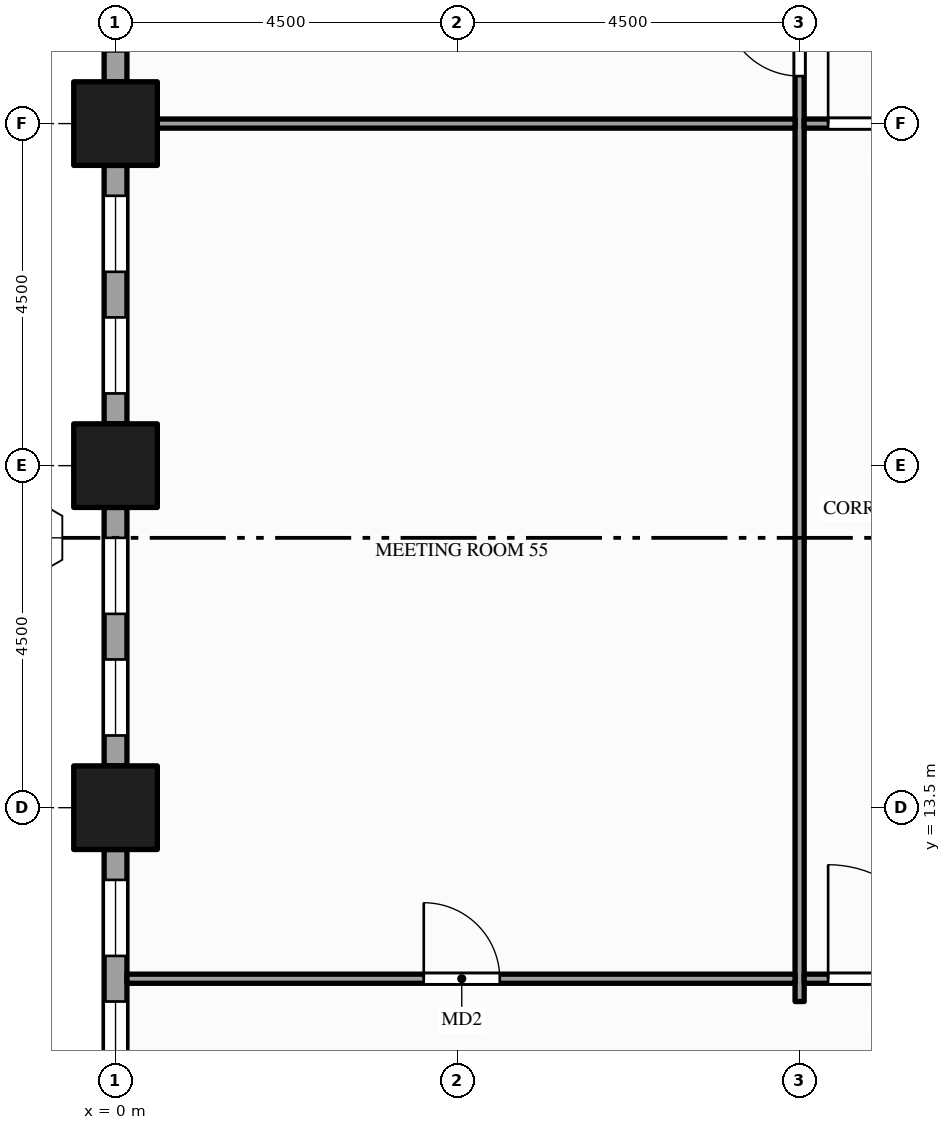
"""IFC4 building model, lengths in metres.
Left out: names, types, materials, properties, quantities, classifications, styles, units other than length and angle.
Written with IfcOpenShell. Run it as: python <this file> out.ifc"""

import sys

from ifc_helpers import new_model, si_unit, direction, frame, frame_2d, origin, origin_2d, place, context, subcontext, project, spatial, rectangle, hollow_rectangle, extrude, element, fill, save


model = new_model("IFC4")
c1 = context("Model", 3, precision=1e-05, world=origin(), true_north=direction((0.0, 1.0)))
c2 = subcontext(c1, "Body", "Model", "MODEL_VIEW")
j1 = project(units=[si_unit("LENGTHUNIT", "METRE"), si_unit("PLANEANGLEUNIT", "RADIAN")], contexts=[c1])
p1 = place(None, origin())
s1 = spatial("IfcSite", under=j1, at=p1, CompositionType="ELEMENT")
p2 = place(p1, origin())
s2 = spatial("IfcBuilding", under=s1, at=p2, CompositionType="ELEMENT")
p3 = place(p2, frame((0.0, 0.0, 8.0)))
s3 = spatial("IfcBuildingStorey", under=s2, at=p3, CompositionType="ELEMENT", Elevation=8.0)
for number, where, z_axis, x_axis in (
    (1, (0.0, 13.5, -0.25), (0.0, 0.0, 1.0), (1.0, 0.0, 0.0)),
    (2, (0.0, 18.0, -0.25), (0.0, 0.0, 1.0), (1.0, 0.0, 0.0)),
    (3, (0.0, 22.5, -0.25), (0.0, 0.0, 1.0), (1.0, 0.0, 0.0)),
):
    element("IfcColumn", number, at=place(p3, frame(where, z_axis=z_axis, x_axis=x_axis)), inside=s3, PredefinedType="COLUMN", context=c2, shape_type="SweptSolid", body=[
        extrude(hollow_rectangle(XDim=1.1, YDim=1.1, WallThickness=0.06, at=origin_2d()), origin(), (0.0, 0.0, 1.0), 6.0),
    ])
p4 = place(p3, frame((0.0, 26.45, 0.0), z_axis=(0.0, 0.0, 1.0), x_axis=(0.0, -1.0, 0.0)))
e4 = element("IfcWall", 4, at=p4, inside=s3, PredefinedType="STANDARD", context=c2, shape_type="SweptSolid", body=[
    extrude(rectangle(XDim=3.4, YDim=0.3, at=frame_2d((1.7, 0.0))), origin(), (0.0, 0.0, 1.0), 5.036),
])
p5 = place(p4, frame((0.4, 0.0, 0.9)))
e5 = element("IfcOpeningElement", 5, at=p5, cuts=e4, PredefinedType="OPENING", context=c2, shape_type="SweptSolid", body=[
    extrude(rectangle(XDim=1.0, YDim=3.5, at=frame_2d((0.5, 1.75))), frame((0.0, 0.16, 0.0), z_axis=(0.0, -1.0, 0.0), x_axis=(1.0, 0.0, 0.0)), (0.0, 0.0, 1.0), 0.32),
])
p6 = place(p4, frame((2.0, 0.0, 0.9)))
e6 = element("IfcOpeningElement", 6, at=p6, cuts=e4, PredefinedType="OPENING", context=c2, shape_type="SweptSolid", body=[
    extrude(rectangle(XDim=1.0, YDim=3.5, at=frame_2d((0.5, 1.75))), frame((0.0, 0.16, 0.0), z_axis=(0.0, -1.0, 0.0), x_axis=(1.0, 0.0, 0.0)), (0.0, 0.0, 1.0), 0.32),
])
p7 = place(p3, frame((0.0, 21.95, 0.0), z_axis=(0.0, 0.0, 1.0), x_axis=(0.0, -1.0, 0.0)))
e7 = element("IfcWall", 7, at=p7, inside=s3, PredefinedType="STANDARD", context=c2, shape_type="SweptSolid", body=[
    extrude(rectangle(XDim=3.4, YDim=0.3, at=frame_2d((1.7, 0.0))), origin(), (0.0, 0.0, 1.0), 5.036),
])
p8 = place(p7, frame((0.4, 0.0, 0.9)))
e8 = element("IfcOpeningElement", 8, at=p8, cuts=e7, PredefinedType="OPENING", context=c2, shape_type="SweptSolid", body=[
    extrude(rectangle(XDim=1.0, YDim=3.5, at=frame_2d((0.5, 1.75))), frame((0.0, 0.16, 0.0), z_axis=(0.0, -1.0, 0.0), x_axis=(1.0, 0.0, 0.0)), (0.0, 0.0, 1.0), 0.32),
])
p9 = place(p7, frame((2.0, 0.0, 0.9)))
e9 = element("IfcOpeningElement", 9, at=p9, cuts=e7, PredefinedType="OPENING", context=c2, shape_type="SweptSolid", body=[
    extrude(rectangle(XDim=1.0, YDim=3.5, at=frame_2d((0.5, 1.75))), frame((0.0, 0.16, 0.0), z_axis=(0.0, -1.0, 0.0), x_axis=(1.0, 0.0, 0.0)), (0.0, 0.0, 1.0), 0.32),
])
p10 = place(p3, frame((0.0, 17.45, 0.0), z_axis=(0.0, 0.0, 1.0), x_axis=(0.0, -1.0, 0.0)))
e10 = element("IfcWall", 10, at=p10, inside=s3, PredefinedType="STANDARD", context=c2, shape_type="SweptSolid", body=[
    extrude(rectangle(XDim=3.4, YDim=0.3, at=frame_2d((1.7, 0.0))), origin(), (0.0, 0.0, 1.0), 5.036),
])
p11 = place(p10, frame((0.4, 0.0, 0.9)))
e11 = element("IfcOpeningElement", 11, at=p11, cuts=e10, PredefinedType="OPENING", context=c2, shape_type="SweptSolid", body=[
    extrude(rectangle(XDim=1.0, YDim=3.5, at=frame_2d((0.5, 1.75))), frame((0.0, 0.16, 0.0), z_axis=(0.0, -1.0, 0.0), x_axis=(1.0, 0.0, 0.0)), (0.0, 0.0, 1.0), 0.32),
])
p12 = place(p10, frame((2.0, 0.0, 0.9)))
e12 = element("IfcOpeningElement", 12, at=p12, cuts=e10, PredefinedType="OPENING", context=c2, shape_type="SweptSolid", body=[
    extrude(rectangle(XDim=1.0, YDim=3.5, at=frame_2d((0.5, 1.75))), frame((0.0, 0.16, 0.0), z_axis=(0.0, -1.0, 0.0), x_axis=(1.0, 0.0, 0.0)), (0.0, 0.0, 1.0), 0.32),
])
p13 = place(p3, frame((0.0, 12.95, 0.0), z_axis=(0.0, 0.0, 1.0), x_axis=(0.0, -1.0, 0.0)))
e13 = element("IfcWall", 13, at=p13, inside=s3, PredefinedType="STANDARD", context=c2, shape_type="SweptSolid", body=[
    extrude(rectangle(XDim=3.4, YDim=0.3, at=frame_2d((1.7, 0.0))), origin(), (0.0, 0.0, 1.0), 5.036),
])
p14 = place(p13, frame((0.4, 0.0, 0.9)))
e14 = element("IfcOpeningElement", 14, at=p14, cuts=e13, PredefinedType="OPENING", context=c2, shape_type="SweptSolid", body=[
    extrude(rectangle(XDim=1.0, YDim=3.5, at=frame_2d((0.5, 1.75))), frame((0.0, 0.16, 0.0), z_axis=(0.0, -1.0, 0.0), x_axis=(1.0, 0.0, 0.0)), (0.0, 0.0, 1.0), 0.32),
])
p15 = place(p13, frame((2.0, 0.0, 0.9)))
e15 = element("IfcOpeningElement", 15, at=p15, cuts=e13, PredefinedType="OPENING", context=c2, shape_type="SweptSolid", body=[
    extrude(rectangle(XDim=1.0, YDim=3.5, at=frame_2d((0.5, 1.75))), frame((0.0, 0.16, 0.0), z_axis=(0.0, -1.0, 0.0), x_axis=(1.0, 0.0, 0.0)), (0.0, 0.0, 1.0), 0.32),
])
p16 = place(p3, frame((9.0, 10.95, 0.0), z_axis=(0.0, 0.0, 1.0), x_axis=(0.0, 1.0, 0.0)))
e16 = element("IfcWall", 16, at=p16, inside=s3, PredefinedType="PARTITIONING", context=c2, shape_type="SweptSolid", body=[
    extrude(rectangle(XDim=20.85, YDim=0.12, at=frame_2d((10.425, 0.0))), origin(), (0.0, 0.0, 1.0), 4.5),
])
p17 = place(p16, frame((12.175, 0.0, 0.0)))
e17 = element("IfcOpeningElement", 17, at=p17, cuts=e16, PredefinedType="OPENING", context=c2, shape_type="SweptSolid", body=[
    extrude(rectangle(XDim=1.0, YDim=2.1, at=frame_2d((0.5, 1.05))), frame((0.0, 0.07, 0.0), z_axis=(0.0, -1.0, 0.0), x_axis=(1.0, 0.0, 0.0)), (0.0, 0.0, 1.0), 0.14),
])
p18 = place(p16, frame((15.55, 0.0, 0.0)))
e18 = element("IfcOpeningElement", 18, at=p18, cuts=e16, PredefinedType="OPENING", context=c2, shape_type="SweptSolid", body=[
    extrude(rectangle(XDim=1.0, YDim=2.1, at=frame_2d((0.5, 1.05))), frame((0.0, 0.07, 0.0), z_axis=(0.0, -1.0, 0.0), x_axis=(1.0, 0.0, 0.0)), (0.0, 0.0, 1.0), 0.14),
])
p19 = place(p16, frame((18.925, 0.0, 0.0)))
e19 = element("IfcOpeningElement", 19, at=p19, cuts=e16, PredefinedType="OPENING", context=c2, shape_type="SweptSolid", body=[
    extrude(rectangle(XDim=1.0, YDim=2.1, at=frame_2d((0.5, 1.05))), frame((0.0, 0.07, 0.0), z_axis=(0.0, -1.0, 0.0), x_axis=(1.0, 0.0, 0.0)), (0.0, 0.0, 1.0), 0.14),
])
p20 = place(p3, frame((0.15, 11.25, 0.0), z_axis=(0.0, 0.0, 1.0), x_axis=(1.0, 0.0, 0.0)))
e20 = element("IfcWall", 20, at=p20, inside=s3, PredefinedType="PARTITIONING", context=c2, shape_type="SweptSolid", body=[
    extrude(rectangle(XDim=8.79, YDim=0.12, at=frame_2d((4.395, 0.0))), origin(), (0.0, 0.0, 1.0), 4.759),
])
p21 = place(p20, frame((3.905, 0.0, 0.0)))
e21 = element("IfcOpeningElement", 21, at=p21, cuts=e20, PredefinedType="OPENING", context=c2, shape_type="SweptSolid", body=[
    extrude(rectangle(XDim=1.0, YDim=2.1, at=frame_2d((0.5, 1.05))), frame((0.0, 0.07, 0.0), z_axis=(0.0, -1.0, 0.0), x_axis=(1.0, 0.0, 0.0)), (0.0, 0.0, 1.0), 0.14),
])
p22 = place(p3, frame((9.06, 11.25, 0.0), z_axis=(0.0, 0.0, 1.0), x_axis=(1.0, 0.0, 0.0)))
e22 = element("IfcWall", 22, at=p22, inside=s3, PredefinedType="PARTITIONING", context=c2, shape_type="SweptSolid", body=[
    extrude(rectangle(XDim=2.13, YDim=0.12, at=frame_2d((1.065, 0.0))), origin(), (0.0, 0.0, 1.0), 4.759),
])
p23 = place(p22, frame((0.315, 0.0, 0.0)))
e23 = element("IfcOpeningElement", 23, at=p23, cuts=e22, PredefinedType="OPENING", context=c2, shape_type="SweptSolid", body=[
    extrude(rectangle(XDim=1.5, YDim=2.1, at=frame_2d((0.75, 1.05))), frame((0.0, 0.07, 0.0), z_axis=(0.0, -1.0, 0.0), x_axis=(1.0, 0.0, 0.0)), (0.0, 0.0, 1.0), 0.14),
])
p24 = place(p3, frame((0.15, 22.5, 0.0), z_axis=(0.0, 0.0, 1.0), x_axis=(1.0, 0.0, 0.0)))
e24 = element("IfcWall", 24, at=p24, inside=s3, PredefinedType="PARTITIONING", context=c2, shape_type="SweptSolid", body=[
    extrude(rectangle(XDim=8.79, YDim=0.12, at=frame_2d((4.395, 0.0))), origin(), (0.0, 0.0, 1.0), 4.5),
])
p25 = place(p3, frame((9.06, 22.5, 0.0), z_axis=(0.0, 0.0, 1.0), x_axis=(1.0, 0.0, 0.0)))
e25 = element("IfcWall", 25, at=p25, inside=s3, PredefinedType="PARTITIONING", context=c2, shape_type="SweptSolid", body=[
    extrude(rectangle(XDim=2.13, YDim=0.12, at=frame_2d((1.065, 0.0))), origin(), (0.0, 0.0, 1.0), 4.5),
])
p26 = place(p25, frame((0.315, 0.0, 0.0)))
e26 = element("IfcOpeningElement", 26, at=p26, cuts=e25, PredefinedType="OPENING", context=c2, shape_type="SweptSolid", body=[
    extrude(rectangle(XDim=1.5, YDim=2.1, at=frame_2d((0.75, 1.05))), frame((0.0, 0.07, 0.0), z_axis=(0.0, -1.0, 0.0), x_axis=(1.0, 0.0, 0.0)), (0.0, 0.0, 1.0), 0.14),
])
p27 = place(p8, origin())
e27 = element("IfcWindow", 27, at=p27, inside=s3, PartitioningType="SINGLE_PANEL", PredefinedType="WINDOW", context=c2, shape_type="SweptSolid", body=[
    extrude(rectangle(XDim=1.0, YDim=3.5, at=frame_2d((0.5, 1.75))), frame((0.0, 0.03, 0.0), z_axis=(0.0, -1.0, 0.0), x_axis=(1.0, 0.0, 0.0)), (0.0, 0.0, 1.0), 0.06),
])
fill(e8, e27)
p28 = place(p9, origin())
e28 = element("IfcWindow", 28, at=p28, inside=s3, PartitioningType="SINGLE_PANEL", PredefinedType="WINDOW", context=c2, shape_type="SweptSolid", body=[
    extrude(rectangle(XDim=1.0, YDim=3.5, at=frame_2d((0.5, 1.75))), frame((0.0, 0.03, 0.0), z_axis=(0.0, -1.0, 0.0), x_axis=(1.0, 0.0, 0.0)), (0.0, 0.0, 1.0), 0.06),
])
fill(e9, e28)
p29 = place(p11, origin())
e29 = element("IfcWindow", 29, at=p29, inside=s3, PartitioningType="SINGLE_PANEL", PredefinedType="WINDOW", context=c2, shape_type="SweptSolid", body=[
    extrude(rectangle(XDim=1.0, YDim=3.5, at=frame_2d((0.5, 1.75))), frame((0.0, 0.03, 0.0), z_axis=(0.0, -1.0, 0.0), x_axis=(1.0, 0.0, 0.0)), (0.0, 0.0, 1.0), 0.06),
])
fill(e11, e29)
p30 = place(p12, origin())
e30 = element("IfcWindow", 30, at=p30, inside=s3, PartitioningType="SINGLE_PANEL", PredefinedType="WINDOW", context=c2, shape_type="SweptSolid", body=[
    extrude(rectangle(XDim=1.0, YDim=3.5, at=frame_2d((0.5, 1.75))), frame((0.0, 0.03, 0.0), z_axis=(0.0, -1.0, 0.0), x_axis=(1.0, 0.0, 0.0)), (0.0, 0.0, 1.0), 0.06),
])
fill(e12, e30)
p31 = place(p14, origin())
e31 = element("IfcWindow", 31, at=p31, inside=s3, PartitioningType="SINGLE_PANEL", PredefinedType="WINDOW", context=c2, shape_type="SweptSolid", body=[
    extrude(rectangle(XDim=1.0, YDim=3.5, at=frame_2d((0.5, 1.75))), frame((0.0, 0.03, 0.0), z_axis=(0.0, -1.0, 0.0), x_axis=(1.0, 0.0, 0.0)), (0.0, 0.0, 1.0), 0.06),
])
fill(e14, e31)
p32 = place(p15, origin())
e32 = element("IfcWindow", 32, at=p32, inside=s3, PartitioningType="SINGLE_PANEL", PredefinedType="WINDOW", context=c2, shape_type="SweptSolid", body=[
    extrude(rectangle(XDim=1.0, YDim=3.5, at=frame_2d((0.5, 1.75))), frame((0.0, 0.03, 0.0), z_axis=(0.0, -1.0, 0.0), x_axis=(1.0, 0.0, 0.0)), (0.0, 0.0, 1.0), 0.06),
])
fill(e15, e32)
p33 = place(p23, origin())
e33 = element("IfcDoor", 33, at=p33, inside=s3, OperationType="SINGLE_SWING_LEFT", PredefinedType="DOOR", context=c2, shape_type="SweptSolid", body=[
    extrude(rectangle(XDim=1.5, YDim=2.1, at=frame_2d((0.75, 1.05))), frame((0.0, 0.025, 0.0), z_axis=(0.0, -1.0, 0.0), x_axis=(1.0, 0.0, 0.0)), (0.0, 0.0, 1.0), 0.05),
])
fill(e23, e33)
p34 = place(p21, origin())
e34 = element("IfcDoor", 34, at=p34, inside=s3, OperationType="SINGLE_SWING_LEFT", PredefinedType="DOOR", context=c2, shape_type="SweptSolid", body=[
    extrude(rectangle(XDim=1.0, YDim=2.1, at=frame_2d((0.5, 1.05))), frame((0.0, 0.025, 0.0), z_axis=(0.0, -1.0, 0.0), x_axis=(1.0, 0.0, 0.0)), (0.0, 0.0, 1.0), 0.05),
])
fill(e21, e34)
p35 = place(p26, origin())
e35 = element("IfcDoor", 35, at=p35, inside=s3, OperationType="SINGLE_SWING_LEFT", PredefinedType="DOOR", context=c2, shape_type="SweptSolid", body=[
    extrude(rectangle(XDim=1.5, YDim=2.1, at=frame_2d((0.75, 1.05))), frame((0.0, 0.025, 0.0), z_axis=(0.0, -1.0, 0.0), x_axis=(1.0, 0.0, 0.0)), (0.0, 0.0, 1.0), 0.05),
])
fill(e26, e35)
p36 = place(p17, origin())
e36 = element("IfcDoor", 36, at=p36, inside=s3, OperationType="SINGLE_SWING_RIGHT", PredefinedType="DOOR", context=c2, shape_type="SweptSolid", body=[
    extrude(rectangle(XDim=1.0, YDim=2.1, at=frame_2d((0.5, 1.05))), frame((0.0, 0.025, 0.0), z_axis=(0.0, -1.0, 0.0), x_axis=(1.0, 0.0, 0.0)), (0.0, 0.0, 1.0), 0.05),
])
fill(e17, e36)
save(model, sys.argv[1])
